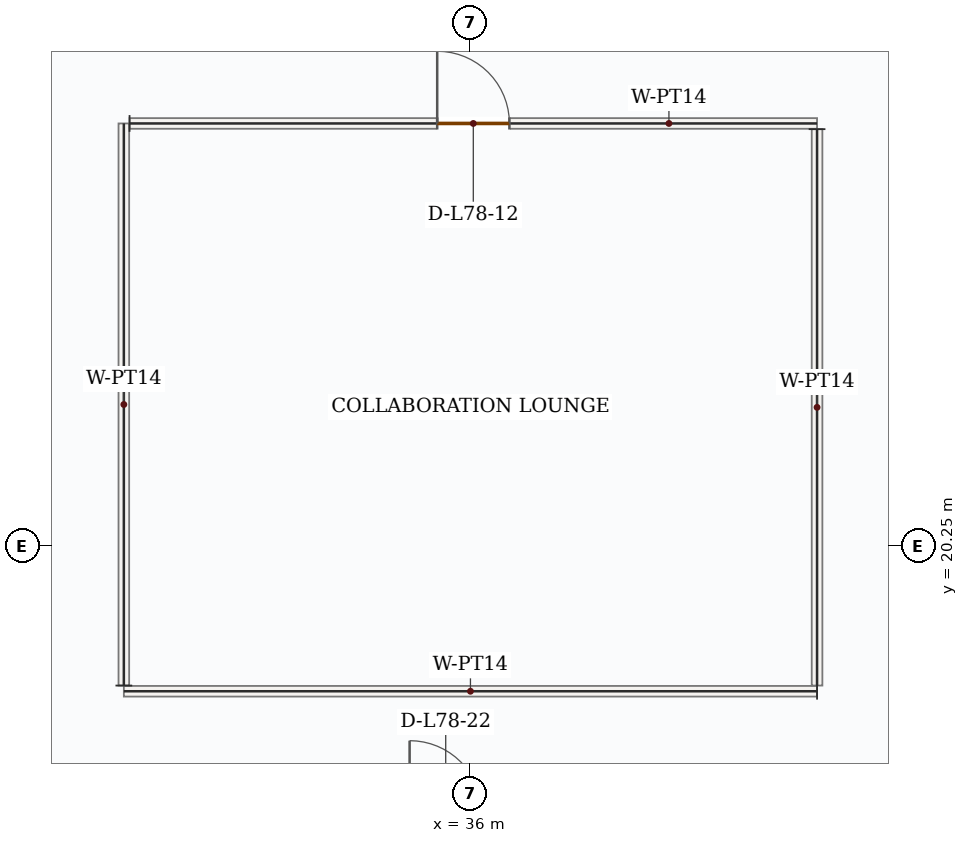
"""IFC4 building model, lengths in metres.
Left out: names, types, materials, properties, quantities, classifications, styles, units other than length and angle.
Written with IfcOpenShell. Run it as: python <this file> out.ifc"""

import sys

from ifc_helpers import new_model, si_unit, direction, frame, frame_2d, origin, place, context, subcontext, project, spatial, rectangle, extrude, source, transform, mapped, element, fill, save


model = new_model("IFC4")
c1 = context("Model", 3, precision=1e-05, world=origin(), true_north=direction((0.0, 1.0)))
c2 = subcontext(c1, "Body", "Model", "MODEL_VIEW")
j1 = project(units=[si_unit("LENGTHUNIT", "METRE"), si_unit("PLANEANGLEUNIT", "RADIAN")], contexts=[c1])
p1 = place(None, origin())
s1 = spatial("IfcSite", under=j1, at=p1, CompositionType="ELEMENT")
p2 = place(p1, origin())
s2 = spatial("IfcBuilding", under=s1, at=p2, CompositionType="ELEMENT")
p3 = place(p2, frame((0.0, 0.0, 323.55)))
s3 = spatial("IfcBuildingStorey", under=s2, at=p3, CompositionType="ELEMENT", Elevation=323.55)
m1 = source(origin(), c2, "Body", "SweptSolid", [
    extrude(rectangle(XDim=9.12, YDim=0.14, at=frame_2d((4.56, 0.0))), origin(), (0.0, 0.0, 1.0), 3.5),
])
p4 = place(p3, frame((40.56, 18.34, 0.0), z_axis=(0.0, 0.0, 1.0), x_axis=(-1.0, 0.0, 0.0)))
e1 = element("IfcWall", 1, at=p4, inside=s3, PredefinedType="PARTITIONING", context=c2, shape_type="MappedRepresentation", body=[
    mapped(m1, transform((0.0, 0.0, 0.0), x_axis=(1.0, 0.0, 0.0), y_axis=(0.0, 1.0, 0.0), z_axis=(0.0, 0.0, 1.0), scale=1.0)),
])
m2 = source(origin(), c2, "Body", "SweptSolid", [
    extrude(rectangle(XDim=7.395, YDim=0.14, at=frame_2d((3.698, 0.0))), origin(), (0.0, 0.0, 1.0), 3.5),
])
p5 = place(p3, frame((31.44, 18.415, 0.0), z_axis=(0.0, 0.0, 1.0), x_axis=(0.0, 1.0, 0.0)))
e2 = element("IfcWall", 2, at=p5, inside=s3, PredefinedType="PARTITIONING", context=c2, shape_type="MappedRepresentation", body=[
    mapped(m2, transform((0.0, 0.0, 0.0), x_axis=(1.0, 0.0, 0.0), y_axis=(0.0, 1.0, 0.0), z_axis=(0.0, 0.0, 1.0), scale=1.0)),
])
p6 = place(p3, frame((31.515, 25.81, 0.0), z_axis=(0.0, 0.0, 1.0), x_axis=(1.0, 0.0, 0.0)))
e3 = element("IfcWall", 3, at=p6, inside=s3, PredefinedType="PARTITIONING", context=c2, shape_type="SweptSolid", body=[
    extrude(rectangle(XDim=9.045, YDim=0.14, at=frame_2d((4.522, 0.0))), origin(), (0.0, 0.0, 1.0), 3.5),
])
p7 = place(p6, frame((4.048, 0.0, 0.0)))
e4 = element("IfcOpeningElement", 4, at=p7, cuts=e3, PredefinedType="OPENING", context=c2, shape_type="SweptSolid", body=[
    extrude(rectangle(XDim=0.95, YDim=2.15, at=frame_2d((0.475, 1.075))), frame((0.0, 0.08, 0.0), z_axis=(0.0, -1.0, 0.0), x_axis=(1.0, 0.0, 0.0)), (0.0, 0.0, 1.0), 0.16),
])
m3 = source(origin(), c2, "Body", "SweptSolid", [
    extrude(rectangle(XDim=7.32, YDim=0.14, at=frame_2d((3.66, 0.0))), origin(), (0.0, 0.0, 1.0), 3.5),
])
p8 = place(p3, frame((40.56, 25.735, 0.0), z_axis=(0.0, 0.0, 1.0), x_axis=(0.0, -1.0, 0.0)))
e5 = element("IfcWall", 5, at=p8, inside=s3, PredefinedType="PARTITIONING", context=c2, shape_type="MappedRepresentation", body=[
    mapped(m3, transform((0.0, 0.0, 0.0), x_axis=(1.0, 0.0, 0.0), y_axis=(0.0, 1.0, 0.0), z_axis=(0.0, 0.0, 1.0), scale=1.0)),
])
m4 = source(origin(), c2, "Body", "SweptSolid", [
    extrude(rectangle(XDim=0.95, YDim=2.15, at=frame_2d((0.475, 1.075))), frame((0.0, 0.025, 0.0), z_axis=(0.0, -1.0, 0.0), x_axis=(1.0, 0.0, 0.0)), (0.0, 0.0, 1.0), 0.05),
])
p9 = place(p7, origin())
e6 = element("IfcDoor", 6, at=p9, inside=s3, OperationType="SINGLE_SWING_LEFT", PredefinedType="DOOR", context=c2, shape_type="MappedRepresentation", body=[
    mapped(m4, transform((0.0, 0.0, 0.0), x_axis=(1.0, 0.0, 0.0), y_axis=(0.0, 1.0, 0.0), z_axis=(0.0, 0.0, 1.0), scale=1.0)),
])
fill(e4, e6)
save(model, sys.argv[1])
